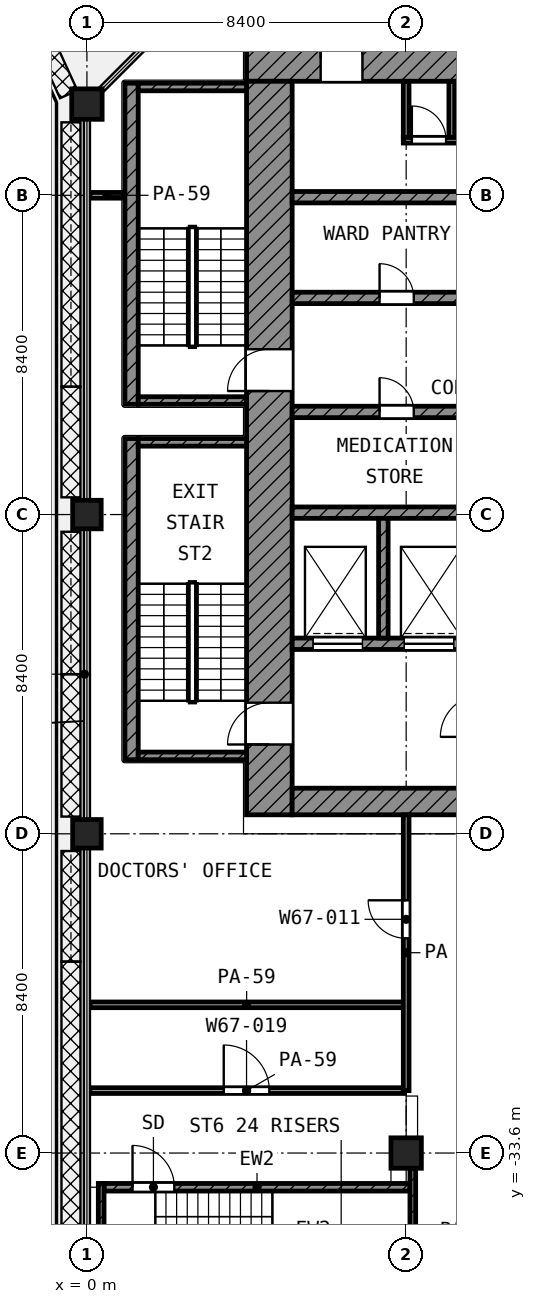
"""IFC4 building model, lengths in metres.
Left out: names, types, materials, properties, quantities, classifications, styles, units other than length and angle.
Written with IfcOpenShell. Run it as: python <this file> out.ifc"""

import sys

from ifc_helpers import new_model, si_unit, direction, frame, frame_2d, origin, origin_2d, place, context, subcontext, project, spatial, rectangle, extrude, element, fill, save


model = new_model("IFC4")
c1 = context("Model", 3, precision=1e-05, world=origin(), true_north=direction((0.0, 1.0)))
c2 = subcontext(c1, "Body", "Model", "MODEL_VIEW")
j1 = project(units=[si_unit("LENGTHUNIT", "METRE"), si_unit("PLANEANGLEUNIT", "RADIAN")], contexts=[c1])
p1 = place(None, origin())
s1 = spatial("IfcSite", under=j1, at=p1, CompositionType="ELEMENT")
p2 = place(p1, origin())
s2 = spatial("IfcBuilding", under=s1, at=p2, CompositionType="ELEMENT")
p3 = place(p2, frame((0.0, 0.0, 311.2)))
s3 = spatial("IfcBuildingStorey", under=s2, at=p3, CompositionType="ELEMENT", Elevation=311.2)
p4 = place(p3, frame((0.0, -6.0, 0.0), z_axis=(0.0, 0.0, 1.0), x_axis=(1.0, 0.0, 0.0)))
e1 = element("IfcColumn", 1, at=p4, inside=s3, PredefinedType="COLUMN", context=c2, shape_type="SweptSolid", body=[
    extrude(rectangle(XDim=0.8, YDim=0.8, at=origin_2d()), origin(), (0.0, 0.0, 1.0), 4.2),
])
for number, where, z_axis, x_axis in (
    (2, (0.0, -16.8, 0.0), (0.0, 0.0, 1.0), (1.0, 0.0, 0.0)),
    (3, (0.0, -25.2, 0.0), (0.0, 0.0, 1.0), (1.0, 0.0, 0.0)),
):
    element("IfcColumn", number, at=place(p3, frame(where, z_axis=z_axis, x_axis=x_axis)), inside=s3, PredefinedType="COLUMN", context=c2, shape_type="SweptSolid", body=[
        extrude(rectangle(XDim=0.75, YDim=0.75, at=origin_2d()), origin(), (0.0, 0.0, 1.0), 4.2),
    ])
p5 = place(p3, frame((8.4, -33.6, 0.0), z_axis=(0.0, 0.0, 1.0), x_axis=(1.0, 0.0, 0.0)))
e4 = element("IfcColumn", 4, at=p5, inside=s3, PredefinedType="COLUMN", context=c2, shape_type="SweptSolid", body=[
    extrude(rectangle(XDim=0.8, YDim=0.8, at=origin_2d()), origin(), (0.0, 0.0, 1.0), 4.2),
])
p6 = place(p3, frame((4.2, -4.8, 0.0), z_axis=(0.0, 0.0, 1.0), x_axis=(1.0, 0.0, 0.0)))
e5 = element("IfcWall", 5, at=p6, inside=s3, PredefinedType="SHEAR", context=c2, shape_type="SweptSolid", body=[
    extrude(rectangle(XDim=20.5, YDim=1.2, at=frame_2d((10.25, 0.0))), origin(), (0.0, 0.0, 1.0), 3.6),
])
p7 = place(p6, frame((1.95, 0.0, 0.0)))
e6 = element("IfcOpeningElement", 6, at=p7, cuts=e5, PredefinedType="OPENING", context=c2, shape_type="SweptSolid", body=[
    extrude(rectangle(XDim=1.1, YDim=2.1, at=frame_2d((0.55, 1.05))), frame((0.0, 0.61, 0.0), z_axis=(0.0, -1.0, 0.0), x_axis=(1.0, 0.0, 0.0)), (0.0, 0.0, 1.0), 1.22),
])
p8 = place(p6, frame((17.95, 0.0, 0.0)))
e7 = element("IfcOpeningElement", 7, at=p8, cuts=e5, PredefinedType="OPENING", context=c2, shape_type="SweptSolid", body=[
    extrude(rectangle(XDim=1.1, YDim=2.1, at=frame_2d((0.55, 1.05))), frame((0.0, 0.61, 0.0), z_axis=(0.0, -1.0, 0.0), x_axis=(1.0, 0.0, 0.0)), (0.0, 0.0, 1.0), 1.22),
])
p9 = place(p3, frame((4.8, -24.7, 0.0), z_axis=(0.0, 0.0, 1.0), x_axis=(0.0, 1.0, 0.0)))
e8 = element("IfcWall", 8, at=p9, inside=s3, PredefinedType="SHEAR", context=c2, shape_type="SweptSolid", body=[
    extrude(rectangle(XDim=19.3, YDim=1.2, at=frame_2d((9.65, 0.0))), origin(), (0.0, 0.0, 1.0), 3.6),
])
p10 = place(p9, frame((11.15, 0.0, 0.0)))
e9 = element("IfcOpeningElement", 9, at=p10, cuts=e8, PredefinedType="OPENING", context=c2, shape_type="SweptSolid", body=[
    extrude(rectangle(XDim=1.1, YDim=2.1, at=frame_2d((0.55, 1.05))), frame((0.0, 0.61, 0.0), z_axis=(0.0, -1.0, 0.0), x_axis=(1.0, 0.0, 0.0)), (0.0, 0.0, 1.0), 1.22),
])
p11 = place(p9, frame((1.85, 0.0, 0.0)))
e10 = element("IfcOpeningElement", 10, at=p11, cuts=e8, PredefinedType="OPENING", context=c2, shape_type="SweptSolid", body=[
    extrude(rectangle(XDim=1.1, YDim=2.1, at=frame_2d((0.55, 1.05))), frame((0.0, 0.61, 0.0), z_axis=(0.0, -1.0, 0.0), x_axis=(1.0, 0.0, 0.0)), (0.0, 0.0, 1.0), 1.22),
])
p12 = place(p3, frame((5.4, -24.35, 0.0), z_axis=(0.0, 0.0, 1.0), x_axis=(1.0, 0.0, 0.0)))
e11 = element("IfcWall", 11, at=p12, inside=s3, PredefinedType="SHEAR", context=c2, shape_type="SweptSolid", body=[
    extrude(rectangle(XDim=18.6, YDim=0.7, at=frame_2d((9.3, 0.0))), origin(), (0.0, 0.0, 1.0), 3.6),
])
p13 = place(p12, frame((6.3, 0.0, 0.0)))
e12 = element("IfcOpeningElement", 12, at=p13, cuts=e11, PredefinedType="OPENING", context=c2, shape_type="SweptSolid", body=[
    extrude(rectangle(XDim=1.8, YDim=2.1, at=frame_2d((0.9, 1.05))), frame((0.0, 0.36, 0.0), z_axis=(0.0, -1.0, 0.0), x_axis=(1.0, 0.0, 0.0)), (0.0, 0.0, 1.0), 0.72),
])
p14 = place(p3, frame((5.4, -8.45, 0.0), z_axis=(0.0, 0.0, 1.0), x_axis=(1.0, 0.0, 0.0)))
e13 = element("IfcWall", 13, at=p14, inside=s3, PredefinedType="SHEAR", context=c2, shape_type="SweptSolid", body=[
    extrude(rectangle(XDim=16.65, YDim=0.3, at=frame_2d((8.325, 0.0))), origin(), (0.0, 0.0, 1.0), 3.6),
])
p15 = place(p3, frame((5.4, -11.1, 0.0), z_axis=(0.0, 0.0, 1.0), x_axis=(1.0, 0.0, 0.0)))
e14 = element("IfcWall", 14, at=p15, inside=s3, PredefinedType="SHEAR", context=c2, shape_type="SweptSolid", body=[
    extrude(rectangle(XDim=16.65, YDim=0.3, at=frame_2d((8.325, 0.0))), origin(), (0.0, 0.0, 1.0), 3.6),
])
p16 = place(p15, frame((2.3, 0.0, 0.0)))
e15 = element("IfcOpeningElement", 15, at=p16, cuts=e14, PredefinedType="OPENING", context=c2, shape_type="SweptSolid", body=[
    extrude(rectangle(XDim=0.9, YDim=2.1, at=frame_2d((0.45, 1.05))), frame((0.0, 0.16, 0.0), z_axis=(0.0, -1.0, 0.0), x_axis=(1.0, 0.0, 0.0)), (0.0, 0.0, 1.0), 0.32),
])
p17 = place(p15, frame((7.8, 0.0, 0.0)))
e16 = element("IfcOpeningElement", 16, at=p17, cuts=e14, PredefinedType="OPENING", context=c2, shape_type="SweptSolid", body=[
    extrude(rectangle(XDim=0.9, YDim=2.1, at=frame_2d((0.45, 1.05))), frame((0.0, 0.16, 0.0), z_axis=(0.0, -1.0, 0.0), x_axis=(1.0, 0.0, 0.0)), (0.0, 0.0, 1.0), 0.32),
])
p18 = place(p15, frame((13.3, 0.0, 0.0)))
e17 = element("IfcOpeningElement", 17, at=p18, cuts=e14, PredefinedType="OPENING", context=c2, shape_type="SweptSolid", body=[
    extrude(rectangle(XDim=0.9, YDim=2.1, at=frame_2d((0.45, 1.05))), frame((0.0, 0.16, 0.0), z_axis=(0.0, -1.0, 0.0), x_axis=(1.0, 0.0, 0.0)), (0.0, 0.0, 1.0), 0.32),
])
p19 = place(p3, frame((5.4, -14.1, 0.0), z_axis=(0.0, 0.0, 1.0), x_axis=(1.0, 0.0, 0.0)))
e18 = element("IfcWall", 18, at=p19, inside=s3, PredefinedType="SHEAR", context=c2, shape_type="SweptSolid", body=[
    extrude(rectangle(XDim=16.65, YDim=0.3, at=frame_2d((8.325, 0.0))), origin(), (0.0, 0.0, 1.0), 3.6),
])
p20 = place(p19, frame((6.325, 0.0, 0.0)))
e19 = element("IfcOpeningElement", 19, at=p20, cuts=e18, PredefinedType="OPENING", context=c2, shape_type="SweptSolid", body=[
    extrude(rectangle(XDim=1.1, YDim=2.1, at=frame_2d((0.55, 1.05))), frame((0.0, 0.16, 0.0), z_axis=(0.0, -1.0, 0.0), x_axis=(1.0, 0.0, 0.0)), (0.0, 0.0, 1.0), 0.32),
])
p21 = place(p19, frame((9.075, 0.0, 0.0)))
e20 = element("IfcOpeningElement", 20, at=p21, cuts=e18, PredefinedType="OPENING", context=c2, shape_type="SweptSolid", body=[
    extrude(rectangle(XDim=1.1, YDim=2.1, at=frame_2d((0.55, 1.05))), frame((0.0, 0.16, 0.0), z_axis=(0.0, -1.0, 0.0), x_axis=(1.0, 0.0, 0.0)), (0.0, 0.0, 1.0), 0.32),
])
p22 = place(p19, frame((11.825, 0.0, 0.0)))
e21 = element("IfcOpeningElement", 21, at=p22, cuts=e18, PredefinedType="OPENING", context=c2, shape_type="SweptSolid", body=[
    extrude(rectangle(XDim=1.1, YDim=2.1, at=frame_2d((0.55, 1.05))), frame((0.0, 0.16, 0.0), z_axis=(0.0, -1.0, 0.0), x_axis=(1.0, 0.0, 0.0)), (0.0, 0.0, 1.0), 0.32),
])
p23 = place(p19, frame((14.575, 0.0, 0.0)))
e22 = element("IfcOpeningElement", 22, at=p23, cuts=e18, PredefinedType="OPENING", context=c2, shape_type="SweptSolid", body=[
    extrude(rectangle(XDim=1.1, YDim=2.1, at=frame_2d((0.55, 1.05))), frame((0.0, 0.16, 0.0), z_axis=(0.0, -1.0, 0.0), x_axis=(1.0, 0.0, 0.0)), (0.0, 0.0, 1.0), 0.32),
])
p24 = place(p19, frame((2.3, 0.0, 0.0)))
e23 = element("IfcOpeningElement", 23, at=p24, cuts=e18, PredefinedType="OPENING", context=c2, shape_type="SweptSolid", body=[
    extrude(rectangle(XDim=0.9, YDim=2.1, at=frame_2d((0.45, 1.05))), frame((0.0, 0.16, 0.0), z_axis=(0.0, -1.0, 0.0), x_axis=(1.0, 0.0, 0.0)), (0.0, 0.0, 1.0), 0.32),
])
p25 = place(p3, frame((5.4, -16.75, 0.0), z_axis=(0.0, 0.0, 1.0), x_axis=(1.0, 0.0, 0.0)))
e24 = element("IfcWall", 24, at=p25, inside=s3, PredefinedType="SHEAR", context=c2, shape_type="SweptSolid", body=[
    extrude(rectangle(XDim=16.65, YDim=0.3, at=frame_2d((8.325, 0.0))), origin(), (0.0, 0.0, 1.0), 3.6),
])
p26 = place(p3, frame((5.4, -20.2, 0.0), z_axis=(0.0, 0.0, 1.0), x_axis=(1.0, 0.0, 0.0)))
e25 = element("IfcWall", 25, at=p26, inside=s3, PredefinedType="SHEAR", context=c2, shape_type="SweptSolid", body=[
    extrude(rectangle(XDim=14.65, YDim=0.3, at=frame_2d((7.325, 0.0))), origin(), (0.0, 0.0, 1.0), 3.6),
])
p27 = place(p26, frame((10.55, 0.0, 0.0)))
e26 = element("IfcOpeningElement", 26, at=p27, cuts=e25, PredefinedType="OPENING", context=c2, shape_type="SweptSolid", body=[
    extrude(rectangle(XDim=1.3, YDim=2.1, at=frame_2d((0.65, 1.05))), frame((0.0, 0.16, 0.0), z_axis=(0.0, -1.0, 0.0), x_axis=(1.0, 0.0, 0.0)), (0.0, 0.0, 1.0), 0.32),
])
p28 = place(p26, frame((12.95, 0.0, 0.0)))
e27 = element("IfcOpeningElement", 27, at=p28, cuts=e25, PredefinedType="OPENING", context=c2, shape_type="SweptSolid", body=[
    extrude(rectangle(XDim=1.3, YDim=2.1, at=frame_2d((0.65, 1.05))), frame((0.0, 0.16, 0.0), z_axis=(0.0, -1.0, 0.0), x_axis=(1.0, 0.0, 0.0)), (0.0, 0.0, 1.0), 0.32),
])
p29 = place(p26, frame((0.55, 0.0, 0.0)))
e28 = element("IfcOpeningElement", 28, at=p29, cuts=e25, PredefinedType="OPENING", context=c2, shape_type="SweptSolid", body=[
    extrude(rectangle(XDim=1.3, YDim=2.1, at=frame_2d((0.65, 1.05))), frame((0.0, 0.16, 0.0), z_axis=(0.0, -1.0, 0.0), x_axis=(1.0, 0.0, 0.0)), (0.0, 0.0, 1.0), 0.32),
])
p30 = place(p26, frame((2.95, 0.0, 0.0)))
e29 = element("IfcOpeningElement", 29, at=p30, cuts=e25, PredefinedType="OPENING", context=c2, shape_type="SweptSolid", body=[
    extrude(rectangle(XDim=1.3, YDim=2.1, at=frame_2d((0.65, 1.05))), frame((0.0, 0.16, 0.0), z_axis=(0.0, -1.0, 0.0), x_axis=(1.0, 0.0, 0.0)), (0.0, 0.0, 1.0), 0.32),
])
p31 = place(p26, frame((7.15, 0.0, 0.0)))
e30 = element("IfcOpeningElement", 30, at=p31, cuts=e25, PredefinedType="OPENING", context=c2, shape_type="SweptSolid", body=[
    extrude(rectangle(XDim=0.9, YDim=2.1, at=frame_2d((0.45, 1.05))), frame((0.0, 0.16, 0.0), z_axis=(0.0, -1.0, 0.0), x_axis=(1.0, 0.0, 0.0)), (0.0, 0.0, 1.0), 0.32),
])
p32 = place(p3, frame((7.8, -20.05, 0.0), z_axis=(0.0, 0.0, 1.0), x_axis=(0.0, 1.0, 0.0)))
e31 = element("IfcWall", 31, at=p32, inside=s3, PredefinedType="SHEAR", context=c2, shape_type="SweptSolid", body=[
    extrude(rectangle(XDim=3.15, YDim=0.25, at=frame_2d((1.575, 0.0))), origin(), (0.0, 0.0, 1.0), 3.6),
])
p33 = place(p3, frame((8.325, -6.95, 0.0), z_axis=(0.0, 0.0, 1.0), x_axis=(1.0, 0.0, 0.0)))
e32 = element("IfcWall", 32, at=p33, inside=s3, PredefinedType="PARTITIONING", context=c2, shape_type="SweptSolid", body=[
    extrude(rectangle(XDim=6.45, YDim=0.15, at=frame_2d((3.225, 0.0))), origin(), (0.0, 0.0, 1.0), 3.6),
])
p34 = place(p33, frame((0.225, 0.0, 0.0)))
e33 = element("IfcOpeningElement", 33, at=p34, cuts=e32, PredefinedType="OPENING", context=c2, shape_type="SweptSolid", body=[
    extrude(rectangle(XDim=0.9, YDim=2.1, at=frame_2d((0.45, 1.05))), frame((0.0, 0.085, 0.0), z_axis=(0.0, -1.0, 0.0), x_axis=(1.0, 0.0, 0.0)), (0.0, 0.0, 1.0), 0.17),
])
p35 = place(p33, frame((1.425, 0.0, 0.0)))
e34 = element("IfcOpeningElement", 34, at=p35, cuts=e32, PredefinedType="OPENING", context=c2, shape_type="SweptSolid", body=[
    extrude(rectangle(XDim=0.9, YDim=2.1, at=frame_2d((0.45, 1.05))), frame((0.0, 0.085, 0.0), z_axis=(0.0, -1.0, 0.0), x_axis=(1.0, 0.0, 0.0)), (0.0, 0.0, 1.0), 0.17),
])
p36 = place(p33, frame((3.225, 0.0, 0.0)))
e35 = element("IfcOpeningElement", 35, at=p36, cuts=e32, PredefinedType="OPENING", context=c2, shape_type="SweptSolid", body=[
    extrude(rectangle(XDim=0.9, YDim=2.1, at=frame_2d((0.45, 1.05))), frame((0.0, 0.085, 0.0), z_axis=(0.0, -1.0, 0.0), x_axis=(1.0, 0.0, 0.0)), (0.0, 0.0, 1.0), 0.17),
])
p37 = place(p33, frame((5.175, 0.0, 0.0)))
e36 = element("IfcOpeningElement", 36, at=p37, cuts=e32, PredefinedType="OPENING", context=c2, shape_type="SweptSolid", body=[
    extrude(rectangle(XDim=0.9, YDim=2.1, at=frame_2d((0.45, 1.05))), frame((0.0, 0.085, 0.0), z_axis=(0.0, -1.0, 0.0), x_axis=(1.0, 0.0, 0.0)), (0.0, 0.0, 1.0), 0.17),
])
for number, where, z_axis, x_axis in (
    (37, (8.4, -6.875, 0.0), (0.0, 0.0, 1.0), (0.0, 1.0, 0.0)),
    (38, (9.6, -6.875, 0.0), (0.0, 0.0, 1.0), (0.0, 1.0, 0.0)),
):
    element("IfcWall", number, at=place(p3, frame(where, z_axis=z_axis, x_axis=x_axis)), inside=s3, PredefinedType="PARTITIONING", context=c2, shape_type="SweptSolid", body=[
        extrude(rectangle(XDim=1.475, YDim=0.15, at=frame_2d((0.738, 0.0))), origin(), (0.0, 0.0, 1.0), 3.6),
    ])
p38 = place(p3, frame((1.175, -13.9, 0.0), z_axis=(0.0, 0.0, 1.0), x_axis=(0.0, 1.0, 0.0)))
e39 = element("IfcWall", 39, at=p38, inside=s3, PredefinedType="SHEAR", context=c2, shape_type="SweptSolid", body=[
    extrude(rectangle(XDim=8.45, YDim=0.35, at=frame_2d((4.225, 0.0))), origin(), (0.0, 0.0, 1.0), 3.6),
])
for number, where, z_axis, x_axis in (
    (40, (1.35, -5.55, 0.0), (0.0, 0.0, 1.0), (1.0, 0.0, 0.0)),
    (41, (1.35, -13.8, 0.0), (0.0, 0.0, 1.0), (1.0, 0.0, 0.0)),
):
    element("IfcWall", number, at=place(p3, frame(where, z_axis=z_axis, x_axis=x_axis)), inside=s3, PredefinedType="SHEAR", context=c2, shape_type="SweptSolid", body=[
        extrude(rectangle(XDim=2.85, YDim=0.2, at=frame_2d((1.425, 0.0))), origin(), (0.0, 0.0, 1.0), 3.6),
    ])
p39 = place(p3, frame((1.175, -23.25, 0.0), z_axis=(0.0, 0.0, 1.0), x_axis=(0.0, 1.0, 0.0)))
e42 = element("IfcWall", 42, at=p39, inside=s3, PredefinedType="SHEAR", context=c2, shape_type="SweptSolid", body=[
    extrude(rectangle(XDim=8.45, YDim=0.35, at=frame_2d((4.225, 0.0))), origin(), (0.0, 0.0, 1.0), 3.6),
])
for number, where, z_axis, x_axis in (
    (43, (1.35, -14.9, 0.0), (0.0, 0.0, 1.0), (1.0, 0.0, 0.0)),
    (44, (1.35, -23.15, 0.0), (0.0, 0.0, 1.0), (1.0, 0.0, 0.0)),
):
    element("IfcWall", number, at=place(p3, frame(where, z_axis=z_axis, x_axis=x_axis)), inside=s3, PredefinedType="SHEAR", context=c2, shape_type="SweptSolid", body=[
        extrude(rectangle(XDim=2.85, YDim=0.2, at=frame_2d((1.425, 0.0))), origin(), (0.0, 0.0, 1.0), 3.6),
    ])
p40 = place(p3, frame((0.375, -40.05, 0.0), z_axis=(0.0, 0.0, 1.0), x_axis=(0.0, 1.0, 0.0)))
e45 = element("IfcWall", 45, at=p40, inside=s3, PredefinedType="SHEAR", context=c2, shape_type="SweptSolid", body=[
    extrude(rectangle(XDim=5.65, YDim=0.15, at=frame_2d((2.825, 0.0))), origin(), (0.0, 0.0, 1.0), 3.6),
])
p41 = place(p3, frame((8.575, -40.05, 0.0), z_axis=(0.0, 0.0, 1.0), x_axis=(0.0, 1.0, 0.0)))
e46 = element("IfcWall", 46, at=p41, inside=s3, PredefinedType="SHEAR", context=c2, shape_type="SweptSolid", body=[
    extrude(rectangle(XDim=6.05, YDim=0.15, at=frame_2d((3.025, 0.0))), origin(), (0.0, 0.0, 1.0), 3.6),
])
p42 = place(p3, frame((0.45, -34.5, 0.0), z_axis=(0.0, 0.0, 1.0), x_axis=(1.0, 0.0, 0.0)))
e47 = element("IfcWall", 47, at=p42, inside=s3, PredefinedType="SHEAR", context=c2, shape_type="SweptSolid", body=[
    extrude(rectangle(XDim=8.05, YDim=0.2, at=frame_2d((4.025, 0.0))), origin(), (0.0, 0.0, 1.0), 3.6),
])
p43 = place(p42, frame((0.75, 0.0, 0.0)))
e48 = element("IfcOpeningElement", 48, at=p43, cuts=e47, PredefinedType="OPENING", context=c2, shape_type="SweptSolid", body=[
    extrude(rectangle(XDim=1.1, YDim=2.1, at=frame_2d((0.55, 1.05))), frame((0.0, 0.11, 0.0), z_axis=(0.0, -1.0, 0.0), x_axis=(1.0, 0.0, 0.0)), (0.0, 0.0, 1.0), 0.22),
])
p44 = place(p3, frame((0.08, -31.957, 0.0), z_axis=(0.0, 0.0, 1.0), x_axis=(1.0, 0.0, 0.0)))
e49 = element("IfcWall", 49, at=p44, inside=s3, PredefinedType="PARTITIONING", context=c2, shape_type="SweptSolid", body=[
    extrude(rectangle(XDim=8.245, YDim=0.15, at=frame_2d((4.123, 0.0))), origin(), (0.0, 0.0, 1.0), 2.7),
])
p45 = place(p44, frame((3.52, 0.0, 0.0)))
e50 = element("IfcOpeningElement", 50, at=p45, cuts=e49, PredefinedType="OPENING", context=c2, shape_type="SweptSolid", body=[
    extrude(rectangle(XDim=1.2, YDim=2.1, at=frame_2d((0.6, 1.05))), frame((0.0, 0.085, 0.0), z_axis=(0.0, -1.0, 0.0), x_axis=(1.0, 0.0, 0.0)), (0.0, 0.0, 1.0), 0.17),
])
p46 = place(p3, frame((0.08, -29.7, 0.0), z_axis=(0.0, 0.0, 1.0), x_axis=(1.0, 0.0, 0.0)))
e51 = element("IfcWall", 51, at=p46, inside=s3, PredefinedType="PARTITIONING", context=c2, shape_type="SweptSolid", body=[
    extrude(rectangle(XDim=8.245, YDim=0.15, at=frame_2d((4.123, 0.0))), origin(), (0.0, 0.0, 1.0), 2.7),
])
p47 = place(p3, frame((0.08, -8.4, 0.0), z_axis=(0.0, 0.0, 1.0), x_axis=(1.0, 0.0, 0.0)))
e52 = element("IfcWall", 52, at=p47, inside=s3, PredefinedType="PARTITIONING", context=c2, shape_type="SweptSolid", body=[
    extrude(rectangle(XDim=0.89, YDim=0.15, at=frame_2d((0.445, 0.0))), origin(), (0.0, 0.0, 1.0), 2.7),
])
p48 = place(p3, frame((8.4, -31.957, 0.0), z_axis=(0.0, 0.0, 1.0), x_axis=(0.0, 1.0, 0.0)))
e53 = element("IfcWall", 53, at=p48, inside=s3, PredefinedType="PARTITIONING", context=c2, shape_type="SweptSolid", body=[
    extrude(rectangle(XDim=7.257, YDim=0.15, at=frame_2d((3.628, 0.0))), origin(), (0.0, 0.0, 1.0), 3.6),
])
p49 = place(p48, frame((4.007, 0.0, 0.0)))
e54 = element("IfcOpeningElement", 54, at=p49, cuts=e53, PredefinedType="OPENING", context=c2, shape_type="SweptSolid", body=[
    extrude(rectangle(XDim=1.0, YDim=2.1, at=frame_2d((0.5, 1.05))), frame((0.0, 0.085, 0.0), z_axis=(0.0, -1.0, 0.0), x_axis=(1.0, 0.0, 0.0)), (0.0, 0.0, 1.0), 0.17),
])
p50 = place(p29, origin())
e55 = element("IfcDoor", 55, at=p50, inside=s3, OperationType="DOUBLE_DOOR_SLIDING", PredefinedType="DOOR", context=c2, shape_type="SweptSolid", body=[
    extrude(rectangle(XDim=1.3, YDim=2.1, at=frame_2d((0.65, 1.05))), frame((0.0, 0.025, 0.0), z_axis=(0.0, -1.0, 0.0), x_axis=(1.0, 0.0, 0.0)), (0.0, 0.0, 1.0), 0.05),
])
fill(e28, e55)
p51 = place(p30, origin())
e56 = element("IfcDoor", 56, at=p51, inside=s3, OperationType="DOUBLE_DOOR_SLIDING", PredefinedType="DOOR", context=c2, shape_type="SweptSolid", body=[
    extrude(rectangle(XDim=1.3, YDim=2.1, at=frame_2d((0.65, 1.05))), frame((0.0, 0.025, 0.0), z_axis=(0.0, -1.0, 0.0), x_axis=(1.0, 0.0, 0.0)), (0.0, 0.0, 1.0), 0.05),
])
fill(e29, e56)
p52 = place(p10, origin())
e57 = element("IfcDoor", 57, at=p52, inside=s3, OperationType="SINGLE_SWING_LEFT", PredefinedType="DOOR", context=c2, shape_type="SweptSolid", body=[
    extrude(rectangle(XDim=1.1, YDim=2.1, at=frame_2d((0.55, 1.05))), frame((0.0, 0.025, 0.0), z_axis=(0.0, -1.0, 0.0), x_axis=(1.0, 0.0, 0.0)), (0.0, 0.0, 1.0), 0.05),
])
fill(e9, e57)
p53 = place(p11, origin())
e58 = element("IfcDoor", 58, at=p53, inside=s3, OperationType="SINGLE_SWING_LEFT", PredefinedType="DOOR", context=c2, shape_type="SweptSolid", body=[
    extrude(rectangle(XDim=1.1, YDim=2.1, at=frame_2d((0.55, 1.05))), frame((0.0, 0.025, 0.0), z_axis=(0.0, -1.0, 0.0), x_axis=(1.0, 0.0, 0.0)), (0.0, 0.0, 1.0), 0.05),
])
fill(e10, e58)
p54 = place(p7, origin())
e59 = element("IfcDoor", 59, at=p54, inside=s3, OperationType="SINGLE_SWING_LEFT", PredefinedType="DOOR", context=c2, shape_type="SweptSolid", body=[
    extrude(rectangle(XDim=1.1, YDim=2.1, at=frame_2d((0.55, 1.05))), frame((0.0, 0.025, 0.0), z_axis=(0.0, -1.0, 0.0), x_axis=(1.0, 0.0, 0.0)), (0.0, 0.0, 1.0), 0.05),
])
fill(e6, e59)
p55 = place(p34, origin())
e60 = element("IfcDoor", 60, at=p55, inside=s3, OperationType="SINGLE_SWING_LEFT", PredefinedType="DOOR", context=c2, shape_type="SweptSolid", body=[
    extrude(rectangle(XDim=0.9, YDim=2.1, at=frame_2d((0.45, 1.05))), frame((0.0, 0.025, 0.0), z_axis=(0.0, -1.0, 0.0), x_axis=(1.0, 0.0, 0.0)), (0.0, 0.0, 1.0), 0.05),
])
fill(e33, e60)
p56 = place(p16, origin())
e61 = element("IfcDoor", 61, at=p56, inside=s3, OperationType="SINGLE_SWING_LEFT", PredefinedType="DOOR", context=c2, shape_type="SweptSolid", body=[
    extrude(rectangle(XDim=0.9, YDim=2.1, at=frame_2d((0.45, 1.05))), frame((0.0, 0.025, 0.0), z_axis=(0.0, -1.0, 0.0), x_axis=(1.0, 0.0, 0.0)), (0.0, 0.0, 1.0), 0.05),
])
fill(e15, e61)
p57 = place(p24, origin())
e62 = element("IfcDoor", 62, at=p57, inside=s3, OperationType="SINGLE_SWING_LEFT", PredefinedType="DOOR", context=c2, shape_type="SweptSolid", body=[
    extrude(rectangle(XDim=0.9, YDim=2.1, at=frame_2d((0.45, 1.05))), frame((0.0, 0.025, 0.0), z_axis=(0.0, -1.0, 0.0), x_axis=(1.0, 0.0, 0.0)), (0.0, 0.0, 1.0), 0.05),
])
fill(e23, e62)
p58 = place(p43, origin())
e63 = element("IfcDoor", 63, at=p58, inside=s3, OperationType="SINGLE_SWING_LEFT", PredefinedType="DOOR", context=c2, shape_type="SweptSolid", body=[
    extrude(rectangle(XDim=1.1, YDim=2.1, at=frame_2d((0.55, 1.05))), frame((0.0, 0.025, 0.0), z_axis=(0.0, -1.0, 0.0), x_axis=(1.0, 0.0, 0.0)), (0.0, 0.0, 1.0), 0.05),
])
fill(e48, e63)
p59 = place(p49, origin())
e64 = element("IfcDoor", 64, at=p59, inside=s3, OperationType="SINGLE_SWING_RIGHT", PredefinedType="DOOR", context=c2, shape_type="SweptSolid", body=[
    extrude(rectangle(XDim=1.0, YDim=2.1, at=frame_2d((0.5, 1.05))), frame((0.0, 0.025, 0.0), z_axis=(0.0, -1.0, 0.0), x_axis=(1.0, 0.0, 0.0)), (0.0, 0.0, 1.0), 0.05),
])
fill(e54, e64)
p60 = place(p45, origin())
e65 = element("IfcDoor", 65, at=p60, inside=s3, OperationType="SINGLE_SWING_LEFT", PredefinedType="DOOR", context=c2, shape_type="SweptSolid", body=[
    extrude(rectangle(XDim=1.2, YDim=2.1, at=frame_2d((0.6, 1.05))), frame((0.0, 0.025, 0.0), z_axis=(0.0, -1.0, 0.0), x_axis=(1.0, 0.0, 0.0)), (0.0, 0.0, 1.0), 0.05),
])
fill(e50, e65)
save(model, sys.argv[1])
